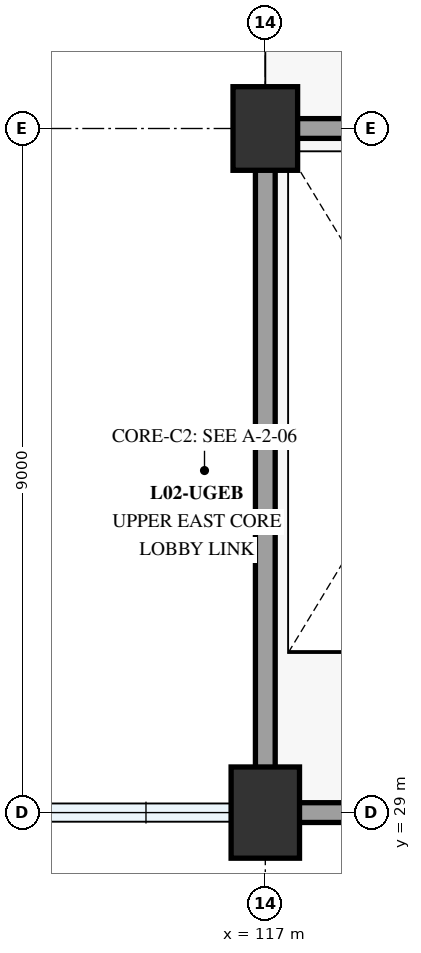
"""IFC4 building model, lengths in metres.
Left out: names, types, materials, properties, quantities, classifications, styles, units other than length and angle.
Written with IfcOpenShell. Run it as: python <this file> out.ifc"""

import sys

from ifc_helpers import new_model, si_unit, direction, frame, frame_2d, origin, origin_2d, place, context, subcontext, project, spatial, rectangle, extrude, element, save


model = new_model("IFC4")
c1 = context("Model", 3, precision=1e-05, world=origin(), true_north=direction((0.0, 1.0)))
c2 = subcontext(c1, "Body", "Model", "MODEL_VIEW")
j1 = project(units=[si_unit("LENGTHUNIT", "METRE"), si_unit("PLANEANGLEUNIT", "RADIAN")], contexts=[c1])
p1 = place(None, origin())
s1 = spatial("IfcSite", under=j1, at=p1, CompositionType="ELEMENT")
p2 = place(p1, origin())
s2 = spatial("IfcBuilding", under=s1, at=p2, CompositionType="ELEMENT")
p3 = place(p2, frame((0.0, 0.0, 8.4)))
s3 = spatial("IfcBuildingStorey", under=s2, at=p3, CompositionType="ELEMENT", Elevation=8.4)
p4 = place(p3, frame((117.0, 29.0, 0.0), z_axis=(0.0, 0.0, 1.0), x_axis=(1.0, 0.0, 0.0)))
e1 = element("IfcColumn", 1, at=p4, inside=s3, PredefinedType="COLUMN", context=c2, shape_type="SweptSolid", body=[
    extrude(rectangle(XDim=0.9, YDim=1.2, at=origin_2d()), origin(), (0.0, 0.0, 1.0), 5.14),
])
p5 = place(p3, frame((117.0, 38.0, 0.0), z_axis=(0.0, 0.0, 1.0), x_axis=(1.0, 0.0, 0.0)))
e2 = element("IfcColumn", 2, at=p5, inside=s3, PredefinedType="COLUMN", context=c2, shape_type="SweptSolid", body=[
    extrude(rectangle(XDim=0.85, YDim=1.1, at=origin_2d()), origin(), (0.0, 0.0, 1.0), 5.14),
])
p6 = place(p3, frame((117.0, 29.35, 0.0), z_axis=(0.0, 0.0, 1.0), x_axis=(0.0, 1.0, 0.0)))
e3 = element("IfcWall", 3, at=p6, inside=s3, PredefinedType="SHEAR", context=c2, shape_type="SweptSolid", body=[
    extrude(rectangle(XDim=8.3, YDim=0.26, at=frame_2d((4.15, 0.0))), origin(), (0.0, 0.0, 1.0), 3.2),
])
p7 = place(p3, frame((117.35, 29.0, 0.0), z_axis=(0.0, 0.0, 1.0), x_axis=(1.0, 0.0, 0.0)))
e4 = element("IfcWall", 4, at=p7, inside=s3, PredefinedType="SHEAR", context=c2, shape_type="SweptSolid", body=[
    extrude(rectangle(XDim=7.5, YDim=0.26, at=frame_2d((3.75, 0.0))), origin(), (0.0, 0.0, 1.0), 3.2),
])
p8 = place(p3, frame((117.35, 38.0, 0.0), z_axis=(0.0, 0.0, 1.0), x_axis=(1.0, 0.0, 0.0)))
e5 = element("IfcWall", 5, at=p8, inside=s3, PredefinedType="SHEAR", context=c2, shape_type="SweptSolid", body=[
    extrude(rectangle(XDim=7.5, YDim=0.26, at=frame_2d((3.75, 0.0))), origin(), (0.0, 0.0, 1.0), 3.2),
])
p9 = place(p8, frame((4.9, 0.0, 0.0)))
e6 = element("IfcOpeningElement", 6, at=p9, cuts=e5, PredefinedType="OPENING", context=c2, shape_type="SweptSolid", body=[
    extrude(rectangle(XDim=1.1, YDim=2.1, at=frame_2d((0.55, 1.05))), frame((0.0, 0.14, 0.0), z_axis=(0.0, -1.0, 0.0), x_axis=(1.0, 0.0, 0.0)), (0.0, 0.0, 1.0), 0.28),
])
save(model, sys.argv[1])
